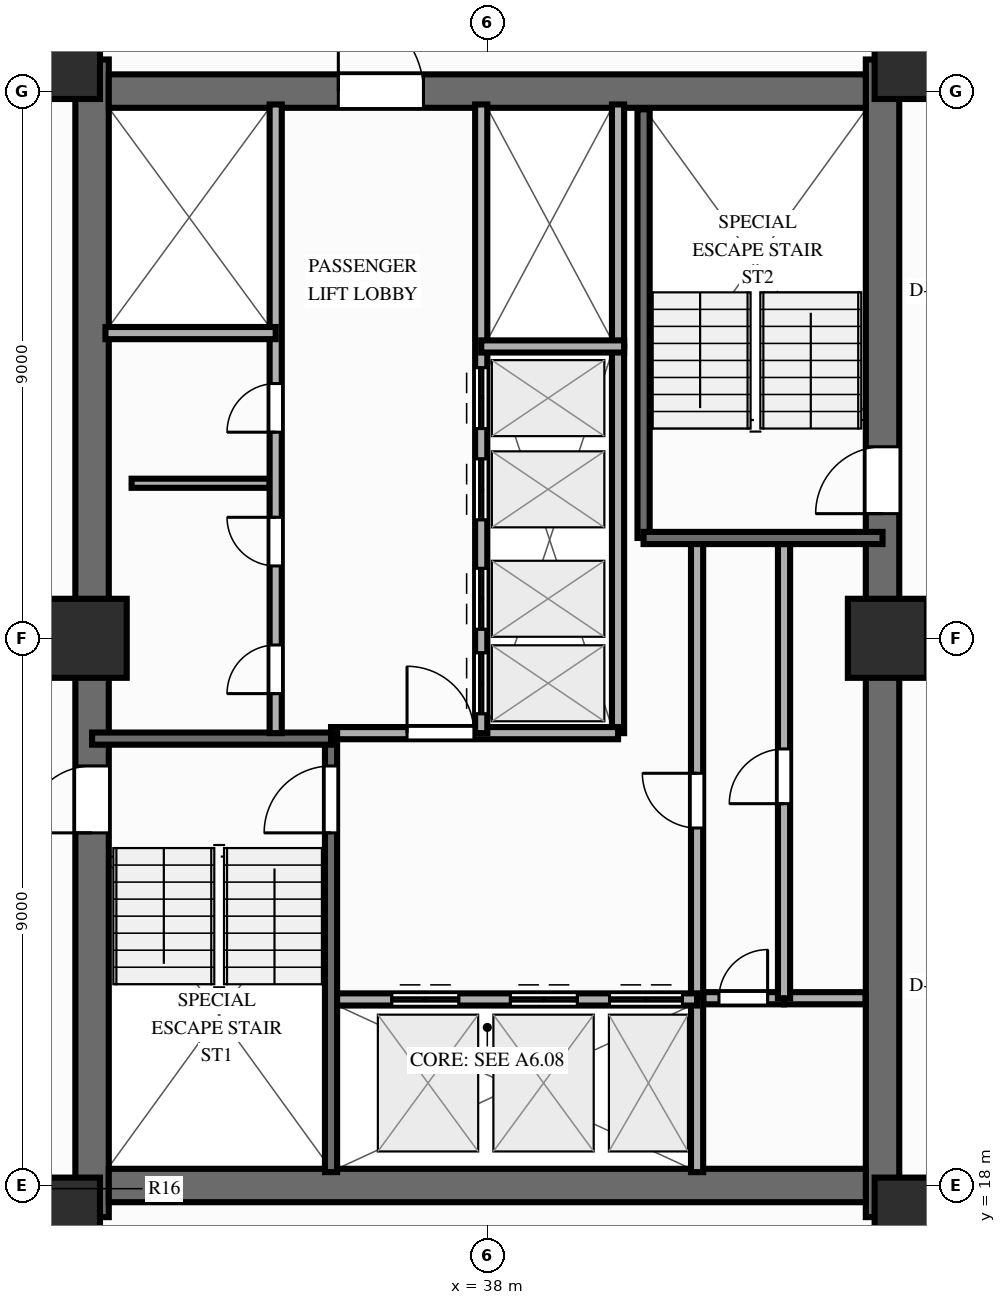
"""IFC4 building model, lengths in metres.
Left out: names, types, materials, properties, quantities, classifications, styles, units other than length and angle.
Written with IfcOpenShell. Run it as: python <this file> out.ifc"""

import sys

from ifc_helpers import new_model, si_unit, direction, frame, frame_2d, origin, origin_2d, place, context, subcontext, project, spatial, rectangle, extrude, source, transform, mapped, element, fill, save


model = new_model("IFC4")
c1 = context("Model", 3, precision=1e-05, world=origin(), true_north=direction((0.0, 1.0)))
c2 = subcontext(c1, "Body", "Model", "MODEL_VIEW")
j1 = project(units=[si_unit("LENGTHUNIT", "METRE"), si_unit("PLANEANGLEUNIT", "RADIAN")], contexts=[c1])
p1 = place(None, origin())
s1 = spatial("IfcSite", under=j1, at=p1, CompositionType="ELEMENT")
p2 = place(p1, origin())
s2 = spatial("IfcBuilding", under=s1, at=p2, CompositionType="ELEMENT")
p3 = place(p2, frame((0.0, 0.0, 107.85)))
s3 = spatial("IfcBuildingStorey", under=s2, at=p3, CompositionType="ELEMENT", Elevation=107.85)
p4 = place(p3, frame((31.5, 17.48, 0.0), z_axis=(0.0, 0.0, 1.0), x_axis=(0.0, 1.0, 0.0)))
e1 = element("IfcWall", 1, at=p4, inside=s3, PredefinedType="SHEAR", context=c2, shape_type="SweptSolid", body=[
    extrude(rectangle(XDim=19.04, YDim=0.55, at=frame_2d((9.52, 0.0))), origin(), (0.0, 0.0, 1.0), 3.0),
])
p5 = place(p4, frame((6.32, 0.0, 0.0)))
e2 = element("IfcOpeningElement", 2, at=p5, cuts=e1, PredefinedType="OPENING", context=c2, shape_type="SweptSolid", body=[
    extrude(rectangle(XDim=1.1, YDim=2.15, at=frame_2d((0.55, 1.075))), frame((0.0, 0.287, 0.0), z_axis=(0.0, -1.0, 0.0), x_axis=(1.0, 0.0, 0.0)), (0.0, 0.0, 1.0), 0.574),
])
p6 = place(p3, frame((44.5, 17.48, 0.0), z_axis=(0.0, 0.0, 1.0), x_axis=(0.0, 1.0, 0.0)))
e3 = element("IfcWall", 3, at=p6, inside=s3, PredefinedType="SHEAR", context=c2, shape_type="SweptSolid", body=[
    extrude(rectangle(XDim=19.04, YDim=0.55, at=frame_2d((9.52, 0.0))), origin(), (0.0, 0.0, 1.0), 3.0),
])
p7 = place(p6, frame((12.67, 0.0, 0.0), z_axis=(0.0, 0.0, 1.0), x_axis=(-1.0, 0.0, 0.0)))
e4 = element("IfcOpeningElement", 4, at=p7, cuts=e3, PredefinedType="OPENING", context=c2, shape_type="SweptSolid", body=[
    extrude(rectangle(XDim=1.1, YDim=2.15, at=frame_2d((0.55, 1.075))), frame((0.0, 0.287, 0.0), z_axis=(0.0, -1.0, 0.0), x_axis=(1.0, 0.0, 0.0)), (0.0, 0.0, 1.0), 0.574),
])
p8 = place(p3, frame((31.775, 18.0, 0.0), z_axis=(0.0, 0.0, 1.0), x_axis=(1.0, 0.0, 0.0)))
e5 = element("IfcWall", 5, at=p8, inside=s3, PredefinedType="SHEAR", context=c2, shape_type="SweptSolid", body=[
    extrude(rectangle(XDim=12.45, YDim=0.55, at=frame_2d((6.225, 0.0))), origin(), (0.0, 0.0, 1.0), 3.0),
])
p9 = place(p3, frame((31.775, 36.0, 0.0), z_axis=(0.0, 0.0, 1.0), x_axis=(1.0, 0.0, 0.0)))
e6 = element("IfcWall", 6, at=p9, inside=s3, PredefinedType="SHEAR", context=c2, shape_type="SweptSolid", body=[
    extrude(rectangle(XDim=12.45, YDim=0.55, at=frame_2d((6.225, 0.0))), origin(), (0.0, 0.0, 1.0), 3.0),
])
p10 = place(p9, frame((5.175, 0.0, 0.0), z_axis=(0.0, 0.0, 1.0), x_axis=(-1.0, 0.0, 0.0)))
e7 = element("IfcOpeningElement", 7, at=p10, cuts=e6, PredefinedType="OPENING", context=c2, shape_type="SweptSolid", body=[
    extrude(rectangle(XDim=1.4, YDim=2.15, at=frame_2d((0.7, 1.075))), frame((0.0, 0.287, 0.0), z_axis=(0.0, -1.0, 0.0), x_axis=(1.0, 0.0, 0.0)), (0.0, 0.0, 1.0), 0.574),
])
m1 = source(origin(), c2, "Body", "SweptSolid", [
    extrude(rectangle(XDim=1.3, YDim=1.3, at=origin_2d()), origin(), (0.0, 0.0, 1.0), 3.0),
])
for number, where, z_axis, x_axis in (
    (8, (30.98, 17.48, 0.0), (0.0, 0.0, 1.0), (1.0, 0.0, 0.0)),
    (9, (45.02, 17.48, 0.0), (0.0, 0.0, 1.0), (1.0, 0.0, 0.0)),
    (10, (30.98, 36.52, 0.0), (0.0, 0.0, 1.0), (1.0, 0.0, 0.0)),
    (11, (45.02, 36.52, 0.0), (0.0, 0.0, 1.0), (1.0, 0.0, 0.0)),
    (12, (31.42, 27.0, 0.0), (0.0, 0.0, 1.0), (1.0, 0.0, 0.0)),
    (13, (44.58, 27.0, 0.0), (0.0, 0.0, 1.0), (1.0, 0.0, 0.0)),
):
    element("IfcColumn", number, at=place(p3, frame(where, z_axis=z_axis, x_axis=x_axis)), inside=s3, PredefinedType="COLUMN", context=c2, shape_type="MappedRepresentation", body=[
        mapped(m1, transform((0.0, 0.0, 0.0), scale=1.0)),
    ])
p11 = place(p3, frame((32.15, 29.55, 0.0), z_axis=(0.0, 0.0, 1.0), x_axis=(1.0, 0.0, 0.0)))
e14 = element("IfcWall", 14, at=p11, inside=s3, PredefinedType="PARTITIONING", context=c2, shape_type="SweptSolid", body=[
    extrude(rectangle(XDim=2.27, YDim=0.15, at=frame_2d((1.135, 0.0))), origin(), (0.0, 0.0, 1.0), 2.79),
])
p12 = place(p3, frame((41.55, 21.08, 0.0), z_axis=(0.0, 0.0, 1.0), x_axis=(1.0, 0.0, 0.0)))
e15 = element("IfcWall", 15, at=p12, inside=s3, PredefinedType="PARTITIONING", context=c2, shape_type="SweptSolid", body=[
    extrude(rectangle(XDim=1.33, YDim=0.2, at=frame_2d((0.665, 0.0))), origin(), (0.0, 0.0, 1.0), 2.79),
])
p13 = place(p12, frame((0.26, 0.0, 0.0)))
e16 = element("IfcOpeningElement", 16, at=p13, cuts=e15, PredefinedType="OPENING", context=c2, shape_type="SweptSolid", body=[
    extrude(rectangle(XDim=0.8, YDim=2.05, at=frame_2d((0.4, 1.025))), frame((0.0, 0.112, 0.0), z_axis=(0.0, -1.0, 0.0), x_axis=(1.0, 0.0, 0.0)), (0.0, 0.0, 1.0), 0.224),
])
p14 = place(p3, frame((42.88, 21.08, 0.0), z_axis=(0.0, 0.0, 1.0), x_axis=(1.0, 0.0, 0.0)))
e17 = element("IfcWall", 17, at=p14, inside=s3, PredefinedType="PARTITIONING", context=c2, shape_type="SweptSolid", body=[
    extrude(rectangle(XDim=1.34, YDim=0.2, at=frame_2d((0.67, 0.0))), origin(), (0.0, 0.0, 1.0), 2.79),
])
p15 = place(p3, frame((42.88, 21.08, 0.0), z_axis=(0.0, 0.0, 1.0), x_axis=(0.0, 1.0, 0.0)))
e18 = element("IfcWall", 18, at=p15, inside=s3, PredefinedType="PARTITIONING", context=c2, shape_type="SweptSolid", body=[
    extrude(rectangle(XDim=7.47, YDim=0.2, at=frame_2d((3.735, 0.0))), origin(), (0.0, 0.0, 1.0), 2.79),
])
p16 = place(p15, frame((3.2, 0.0, 0.0)))
e19 = element("IfcOpeningElement", 19, at=p16, cuts=e18, PredefinedType="OPENING", context=c2, shape_type="SweptSolid", body=[
    extrude(rectangle(XDim=0.9, YDim=2.1, at=frame_2d((0.45, 1.05))), frame((0.0, 0.112, 0.0), z_axis=(0.0, -1.0, 0.0), x_axis=(1.0, 0.0, 0.0)), (0.0, 0.0, 1.0), 0.224),
])
p17 = place(p3, frame((41.45, 18.22, 0.0), z_axis=(0.0, 0.0, 1.0), x_axis=(0.0, 1.0, 0.0)))
e20 = element("IfcWall", 20, at=p17, inside=s3, PredefinedType="PARTITIONING", context=c2, shape_type="SweptSolid", body=[
    extrude(rectangle(XDim=2.86, YDim=0.2, at=frame_2d((1.43, 0.0))), origin(), (0.0, 0.0, 1.0), 2.79),
])
p18 = place(p3, frame((41.45, 21.08, 0.0), z_axis=(0.0, 0.0, 1.0), x_axis=(0.0, 1.0, 0.0)))
e21 = element("IfcWall", 21, at=p18, inside=s3, PredefinedType="PARTITIONING", context=c2, shape_type="SweptSolid", body=[
    extrude(rectangle(XDim=7.52, YDim=0.2, at=frame_2d((3.76, 0.0))), origin(), (0.0, 0.0, 1.0), 2.79),
])
p19 = place(p18, frame((2.8, 0.0, 0.0)))
e22 = element("IfcOpeningElement", 22, at=p19, cuts=e21, PredefinedType="OPENING", context=c2, shape_type="SweptSolid", body=[
    extrude(rectangle(XDim=0.9, YDim=2.1, at=frame_2d((0.45, 1.05))), frame((0.0, 0.112, 0.0), z_axis=(0.0, -1.0, 0.0), x_axis=(1.0, 0.0, 0.0)), (0.0, 0.0, 1.0), 0.224),
])
p20 = place(p3, frame((40.15, 25.44, 0.0), z_axis=(0.0, 0.0, 1.0), x_axis=(0.0, 1.0, 0.0)))
e23 = element("IfcWall", 23, at=p20, inside=s3, PredefinedType="PARTITIONING", context=c2, shape_type="SweptSolid", body=[
    extrude(rectangle(XDim=6.36, YDim=0.2, at=frame_2d((3.18, 0.0))), origin(), (0.0, 0.0, 1.0), 2.79),
])
p21 = place(p3, frame((40.15, 31.8, 0.0), z_axis=(0.0, 0.0, 1.0), x_axis=(0.0, 1.0, 0.0)))
e24 = element("IfcWall", 24, at=p21, inside=s3, PredefinedType="PARTITIONING", context=c2, shape_type="SweptSolid", body=[
    extrude(rectangle(XDim=3.98, YDim=0.2, at=frame_2d((1.99, 0.0))), origin(), (0.0, 0.0, 1.0), 2.79),
])
p22 = place(p3, frame((35.43, 21.06, 0.0), z_axis=(0.0, 0.0, 1.0), x_axis=(1.0, 0.0, 0.0)))
e25 = element("IfcWall", 25, at=p22, inside=s3, PredefinedType="PARTITIONING", context=c2, shape_type="SweptSolid", body=[
    extrude(rectangle(XDim=6.02, YDim=0.2, at=frame_2d((3.01, 0.0))), origin(), (0.0, 0.0, 1.0), 2.79),
])
p23 = place(p22, frame((1.0, 0.0, 0.0)))
e26 = element("IfcOpeningElement", 26, at=p23, cuts=e25, PredefinedType="OPENING", context=c2, shape_type="SweptSolid", body=[
    extrude(rectangle(XDim=1.1, YDim=2.15, at=frame_2d((0.55, 1.075))), frame((0.0, 0.112, 0.0), z_axis=(0.0, -1.0, 0.0), x_axis=(1.0, 0.0, 0.0)), (0.0, 0.0, 1.0), 0.224),
])
p24 = place(p22, frame((2.95, 0.0, 0.0)))
e27 = element("IfcOpeningElement", 27, at=p24, cuts=e25, PredefinedType="OPENING", context=c2, shape_type="SweptSolid", body=[
    extrude(rectangle(XDim=1.1, YDim=2.15, at=frame_2d((0.55, 1.075))), frame((0.0, 0.112, 0.0), z_axis=(0.0, -1.0, 0.0), x_axis=(1.0, 0.0, 0.0)), (0.0, 0.0, 1.0), 0.224),
])
p25 = place(p22, frame((4.58, 0.0, 0.0)))
e28 = element("IfcOpeningElement", 28, at=p25, cuts=e25, PredefinedType="OPENING", context=c2, shape_type="SweptSolid", body=[
    extrude(rectangle(XDim=1.2, YDim=2.15, at=frame_2d((0.6, 1.075))), frame((0.0, 0.112, 0.0), z_axis=(0.0, -1.0, 0.0), x_axis=(1.0, 0.0, 0.0)), (0.0, 0.0, 1.0), 0.224),
])
p26 = place(p3, frame((35.43, 25.44, 0.0), z_axis=(0.0, 0.0, 1.0), x_axis=(1.0, 0.0, 0.0)))
e29 = element("IfcWall", 29, at=p26, inside=s3, PredefinedType="PARTITIONING", context=c2, shape_type="SweptSolid", body=[
    extrude(rectangle(XDim=4.72, YDim=0.2, at=frame_2d((2.36, 0.0))), origin(), (0.0, 0.0, 1.0), 2.79),
])
p27 = place(p26, frame((1.25, 0.0, 0.0)))
e30 = element("IfcOpeningElement", 30, at=p27, cuts=e29, PredefinedType="OPENING", context=c2, shape_type="SweptSolid", body=[
    extrude(rectangle(XDim=1.1, YDim=2.15, at=frame_2d((0.55, 1.075))), frame((0.0, 0.112, 0.0), z_axis=(0.0, -1.0, 0.0), x_axis=(1.0, 0.0, 0.0)), (0.0, 0.0, 1.0), 0.224),
])
p28 = place(p3, frame((35.43, 18.22, 0.0), z_axis=(0.0, 0.0, 1.0), x_axis=(0.0, 1.0, 0.0)))
e31 = element("IfcWall", 31, at=p28, inside=s3, PredefinedType="SOLIDWALL", context=c2, shape_type="SweptSolid", body=[
    extrude(rectangle(XDim=7.22, YDim=0.2, at=frame_2d((3.61, 0.0))), origin(), (0.0, 0.0, 1.0), 2.79),
])
p29 = place(p28, frame((6.68, 0.0, 0.0), z_axis=(0.0, 0.0, 1.0), x_axis=(-1.0, 0.0, 0.0)))
e32 = element("IfcOpeningElement", 32, at=p29, cuts=e31, PredefinedType="OPENING", context=c2, shape_type="SweptSolid", body=[
    extrude(rectangle(XDim=1.1, YDim=2.15, at=frame_2d((0.55, 1.075))), frame((0.0, 0.112, 0.0), z_axis=(0.0, -1.0, 0.0), x_axis=(1.0, 0.0, 0.0)), (0.0, 0.0, 1.0), 0.224),
])
p30 = place(p3, frame((31.5, 25.35, 0.0), z_axis=(0.0, 0.0, 1.0), x_axis=(1.0, 0.0, 0.0)))
e33 = element("IfcWall", 33, at=p30, inside=s3, PredefinedType="SOLIDWALL", context=c2, shape_type="SweptSolid", body=[
    extrude(rectangle(XDim=3.93, YDim=0.2, at=frame_2d((1.965, 0.0))), origin(), (0.0, 0.0, 1.0), 2.79),
])
p31 = place(p3, frame((40.57, 28.65, 0.0), z_axis=(0.0, 0.0, 1.0), x_axis=(0.0, 1.0, 0.0)))
e34 = element("IfcWall", 34, at=p31, inside=s3, PredefinedType="SOLIDWALL", context=c2, shape_type="SweptSolid", body=[
    extrude(rectangle(XDim=7.05, YDim=0.2, at=frame_2d((3.525, 0.0))), origin(), (0.0, 0.0, 1.0), 2.79),
])
p32 = place(p3, frame((40.57, 28.65, 0.0), z_axis=(0.0, 0.0, 1.0), x_axis=(1.0, 0.0, 0.0)))
e35 = element("IfcWall", 35, at=p32, inside=s3, PredefinedType="SOLIDWALL", context=c2, shape_type="SweptSolid", body=[
    extrude(rectangle(XDim=3.93, YDim=0.2, at=frame_2d((1.965, 0.0))), origin(), (0.0, 0.0, 1.0), 2.79),
])
p33 = place(p3, frame((34.52, 25.44, 0.0), z_axis=(0.0, 0.0, 1.0), x_axis=(0.0, 1.0, 0.0)))
e36 = element("IfcWall", 36, at=p33, inside=s3, PredefinedType="PARTITIONING", context=c2, shape_type="SweptSolid", body=[
    extrude(rectangle(XDim=10.34, YDim=0.2, at=frame_2d((5.17, 0.0))), origin(), (0.0, 0.0, 1.0), 2.79),
])
p34 = place(p33, frame((0.65, 0.0, 0.0)))
e37 = element("IfcOpeningElement", 37, at=p34, cuts=e36, PredefinedType="OPENING", context=c2, shape_type="SweptSolid", body=[
    extrude(rectangle(XDim=0.8, YDim=2.05, at=frame_2d((0.4, 1.025))), frame((0.0, 0.112, 0.0), z_axis=(0.0, -1.0, 0.0), x_axis=(1.0, 0.0, 0.0)), (0.0, 0.0, 1.0), 0.224),
])
p35 = place(p33, frame((2.75, 0.0, 0.0)))
e38 = element("IfcOpeningElement", 38, at=p35, cuts=e36, PredefinedType="OPENING", context=c2, shape_type="SweptSolid", body=[
    extrude(rectangle(XDim=0.8, YDim=2.05, at=frame_2d((0.4, 1.025))), frame((0.0, 0.112, 0.0), z_axis=(0.0, -1.0, 0.0), x_axis=(1.0, 0.0, 0.0)), (0.0, 0.0, 1.0), 0.224),
])
p36 = place(p33, frame((4.95, 0.0, 0.0)))
e39 = element("IfcOpeningElement", 39, at=p36, cuts=e36, PredefinedType="OPENING", context=c2, shape_type="SweptSolid", body=[
    extrude(rectangle(XDim=0.8, YDim=2.05, at=frame_2d((0.4, 1.025))), frame((0.0, 0.112, 0.0), z_axis=(0.0, -1.0, 0.0), x_axis=(1.0, 0.0, 0.0)), (0.0, 0.0, 1.0), 0.224),
])
p37 = place(p3, frame((31.72, 32.02, 0.0), z_axis=(0.0, 0.0, 1.0), x_axis=(1.0, 0.0, 0.0)))
e40 = element("IfcWall", 40, at=p37, inside=s3, PredefinedType="PARTITIONING", context=c2, shape_type="SweptSolid", body=[
    extrude(rectangle(XDim=2.8, YDim=0.2, at=frame_2d((1.4, 0.0))), origin(), (0.0, 0.0, 1.0), 2.79),
])
p38 = place(p3, frame((37.9, 25.44, 0.0), z_axis=(0.0, 0.0, 1.0), x_axis=(0.0, 1.0, 0.0)))
e41 = element("IfcWall", 41, at=p38, inside=s3, PredefinedType="PARTITIONING", context=c2, shape_type="SweptSolid", body=[
    extrude(rectangle(XDim=10.34, YDim=0.2, at=frame_2d((5.17, 0.0))), origin(), (0.0, 0.0, 1.0), 2.79),
])
p39 = place(p38, frame((0.32, 0.0, 0.0)))
e42 = element("IfcOpeningElement", 42, at=p39, cuts=e41, PredefinedType="OPENING", context=c2, shape_type="SweptSolid", body=[
    extrude(rectangle(XDim=1.0, YDim=2.15, at=frame_2d((0.5, 1.075))), frame((0.0, 0.112, 0.0), z_axis=(0.0, -1.0, 0.0), x_axis=(1.0, 0.0, 0.0)), (0.0, 0.0, 1.0), 0.224),
])
p40 = place(p38, frame((1.71, 0.0, 0.0)))
e43 = element("IfcOpeningElement", 43, at=p40, cuts=e41, PredefinedType="OPENING", context=c2, shape_type="SweptSolid", body=[
    extrude(rectangle(XDim=1.0, YDim=2.15, at=frame_2d((0.5, 1.075))), frame((0.0, 0.112, 0.0), z_axis=(0.0, -1.0, 0.0), x_axis=(1.0, 0.0, 0.0)), (0.0, 0.0, 1.0), 0.224),
])
p41 = place(p38, frame((3.51, 0.0, 0.0)))
e44 = element("IfcOpeningElement", 44, at=p41, cuts=e41, PredefinedType="OPENING", context=c2, shape_type="SweptSolid", body=[
    extrude(rectangle(XDim=1.0, YDim=2.15, at=frame_2d((0.5, 1.075))), frame((0.0, 0.112, 0.0), z_axis=(0.0, -1.0, 0.0), x_axis=(1.0, 0.0, 0.0)), (0.0, 0.0, 1.0), 0.224),
])
p42 = place(p38, frame((5.01, 0.0, 0.0)))
e45 = element("IfcOpeningElement", 45, at=p42, cuts=e41, PredefinedType="OPENING", context=c2, shape_type="SweptSolid", body=[
    extrude(rectangle(XDim=1.0, YDim=2.15, at=frame_2d((0.5, 1.075))), frame((0.0, 0.112, 0.0), z_axis=(0.0, -1.0, 0.0), x_axis=(1.0, 0.0, 0.0)), (0.0, 0.0, 1.0), 0.224),
])
p43 = place(p3, frame((37.9, 31.8, 0.0), z_axis=(0.0, 0.0, 1.0), x_axis=(1.0, 0.0, 0.0)))
e46 = element("IfcWall", 46, at=p43, inside=s3, PredefinedType="PARTITIONING", context=c2, shape_type="SweptSolid", body=[
    extrude(rectangle(XDim=2.35, YDim=0.2, at=frame_2d((1.175, 0.0))), origin(), (0.0, 0.0, 1.0), 2.79),
])
m2 = source(origin(), c2, "Body", "SweptSolid", [
    extrude(rectangle(XDim=1.1, YDim=2.15, at=frame_2d((0.55, 1.075))), frame((0.0, 0.025, 0.0), z_axis=(0.0, -1.0, 0.0), x_axis=(1.0, 0.0, 0.0)), (0.0, 0.0, 1.0), 0.05),
])
p44 = place(p5, origin())
e47 = element("IfcDoor", 47, at=p44, inside=s3, OperationType="SINGLE_SWING_LEFT", PredefinedType="DOOR", context=c2, shape_type="MappedRepresentation", body=[
    mapped(m2, transform((0.0, 0.0, 0.0), scale=1.0)),
])
fill(e2, e47)
p45 = place(p7, origin())
e48 = element("IfcDoor", 48, at=p45, inside=s3, OperationType="SINGLE_SWING_RIGHT", PredefinedType="DOOR", context=c2, shape_type="MappedRepresentation", body=[
    mapped(m2, transform((0.0, 0.0, 0.0), scale=1.0)),
])
fill(e4, e48)
m3 = source(origin(), c2, "Body", "SweptSolid", [
    extrude(rectangle(XDim=1.4, YDim=2.15, at=frame_2d((0.7, 1.075))), frame((0.0, 0.025, 0.0), z_axis=(0.0, -1.0, 0.0), x_axis=(1.0, 0.0, 0.0)), (0.0, 0.0, 1.0), 0.05),
])
p46 = place(p10, origin())
e49 = element("IfcDoor", 49, at=p46, inside=s3, OperationType="SINGLE_SWING_RIGHT", PredefinedType="DOOR", context=c2, shape_type="MappedRepresentation", body=[
    mapped(m3, transform((0.0, 0.0, 0.0), scale=1.0)),
])
fill(e7, e49)
m4 = source(origin(), c2, "Body", "SweptSolid", [
    extrude(rectangle(XDim=0.8, YDim=2.05, at=frame_2d((0.4, 1.025))), frame((0.0, 0.025, 0.0), z_axis=(0.0, -1.0, 0.0), x_axis=(1.0, 0.0, 0.0)), (0.0, 0.0, 1.0), 0.05),
])
p47 = place(p13, origin())
e50 = element("IfcDoor", 50, at=p47, inside=s3, OperationType="SINGLE_SWING_RIGHT", PredefinedType="DOOR", context=c2, shape_type="MappedRepresentation", body=[
    mapped(m4, transform((0.0, 0.0, 0.0), scale=1.0)),
])
fill(e16, e50)
m5 = source(origin(), c2, "Body", "SweptSolid", [
    extrude(rectangle(XDim=0.9, YDim=2.1, at=frame_2d((0.45, 1.05))), frame((0.0, 0.025, 0.0), z_axis=(0.0, -1.0, 0.0), x_axis=(1.0, 0.0, 0.0)), (0.0, 0.0, 1.0), 0.05),
])
p48 = place(p16, origin())
e51 = element("IfcDoor", 51, at=p48, inside=s3, OperationType="SINGLE_SWING_LEFT", PredefinedType="DOOR", context=c2, shape_type="MappedRepresentation", body=[
    mapped(m5, transform((0.0, 0.0, 0.0), scale=1.0)),
])
fill(e19, e51)
p49 = place(p19, origin())
e52 = element("IfcDoor", 52, at=p49, inside=s3, OperationType="SINGLE_SWING_RIGHT", PredefinedType="DOOR", context=c2, shape_type="MappedRepresentation", body=[
    mapped(m5, transform((0.0, 0.0, 0.0), scale=1.0)),
])
fill(e22, e52)
p50 = place(p23, origin())
e53 = element("IfcDoor", 53, at=p50, inside=s3, OperationType="DOUBLE_DOOR_SLIDING", PredefinedType="DOOR", context=c2, shape_type="MappedRepresentation", body=[
    mapped(m2, transform((0.0, 0.0, 0.0), scale=1.0)),
])
fill(e26, e53)
p51 = place(p24, origin())
e54 = element("IfcDoor", 54, at=p51, inside=s3, OperationType="DOUBLE_DOOR_SLIDING", PredefinedType="DOOR", context=c2, shape_type="MappedRepresentation", body=[
    mapped(m2, transform((0.0, 0.0, 0.0), scale=1.0)),
])
fill(e27, e54)
m6 = source(origin(), c2, "Body", "SweptSolid", [
    extrude(rectangle(XDim=1.2, YDim=2.15, at=frame_2d((0.6, 1.075))), frame((0.0, 0.025, 0.0), z_axis=(0.0, -1.0, 0.0), x_axis=(1.0, 0.0, 0.0)), (0.0, 0.0, 1.0), 0.05),
])
p52 = place(p25, origin())
e55 = element("IfcDoor", 55, at=p52, inside=s3, OperationType="DOUBLE_DOOR_SLIDING", PredefinedType="DOOR", context=c2, shape_type="MappedRepresentation", body=[
    mapped(m6, transform((0.0, 0.0, 0.0), scale=1.0)),
])
fill(e28, e55)
p53 = place(p27, origin())
e56 = element("IfcDoor", 56, at=p53, inside=s3, OperationType="SINGLE_SWING_LEFT", PredefinedType="DOOR", context=c2, shape_type="MappedRepresentation", body=[
    mapped(m2, transform((0.0, 0.0, 0.0), scale=1.0)),
])
fill(e30, e56)
p54 = place(p29, origin())
e57 = element("IfcDoor", 57, at=p54, inside=s3, OperationType="SINGLE_SWING_RIGHT", PredefinedType="DOOR", context=c2, shape_type="MappedRepresentation", body=[
    mapped(m2, transform((0.0, 0.0, 0.0), scale=1.0)),
])
fill(e32, e57)
p55 = place(p34, origin())
e58 = element("IfcDoor", 58, at=p55, inside=s3, OperationType="SINGLE_SWING_LEFT", PredefinedType="DOOR", context=c2, shape_type="MappedRepresentation", body=[
    mapped(m4, transform((0.0, 0.0, 0.0), scale=1.0)),
])
fill(e37, e58)
p56 = place(p35, origin())
e59 = element("IfcDoor", 59, at=p56, inside=s3, OperationType="SINGLE_SWING_RIGHT", PredefinedType="DOOR", context=c2, shape_type="MappedRepresentation", body=[
    mapped(m4, transform((0.0, 0.0, 0.0), scale=1.0)),
])
fill(e38, e59)
p57 = place(p36, origin())
e60 = element("IfcDoor", 60, at=p57, inside=s3, OperationType="SINGLE_SWING_LEFT", PredefinedType="DOOR", context=c2, shape_type="MappedRepresentation", body=[
    mapped(m4, transform((0.0, 0.0, 0.0), scale=1.0)),
])
fill(e39, e60)
m7 = source(origin(), c2, "Body", "SweptSolid", [
    extrude(rectangle(XDim=1.0, YDim=2.15, at=frame_2d((0.5, 1.075))), frame((0.0, 0.025, 0.0), z_axis=(0.0, -1.0, 0.0), x_axis=(1.0, 0.0, 0.0)), (0.0, 0.0, 1.0), 0.05),
])
p58 = place(p39, origin())
e61 = element("IfcDoor", 61, at=p58, inside=s3, OperationType="DOUBLE_DOOR_SLIDING", PredefinedType="DOOR", context=c2, shape_type="MappedRepresentation", body=[
    mapped(m7, transform((0.0, 0.0, 0.0), scale=1.0)),
])
fill(e42, e61)
p59 = place(p40, origin())
e62 = element("IfcDoor", 62, at=p59, inside=s3, OperationType="DOUBLE_DOOR_SLIDING", PredefinedType="DOOR", context=c2, shape_type="MappedRepresentation", body=[
    mapped(m7, transform((0.0, 0.0, 0.0), scale=1.0)),
])
fill(e43, e62)
p60 = place(p41, origin())
e63 = element("IfcDoor", 63, at=p60, inside=s3, OperationType="DOUBLE_DOOR_SLIDING", PredefinedType="DOOR", context=c2, shape_type="MappedRepresentation", body=[
    mapped(m7, transform((0.0, 0.0, 0.0), scale=1.0)),
])
fill(e44, e63)
p61 = place(p42, origin())
e64 = element("IfcDoor", 64, at=p61, inside=s3, OperationType="DOUBLE_DOOR_SLIDING", PredefinedType="DOOR", context=c2, shape_type="MappedRepresentation", body=[
    mapped(m7, transform((0.0, 0.0, 0.0), scale=1.0)),
])
fill(e45, e64)
save(model, sys.argv[1])
